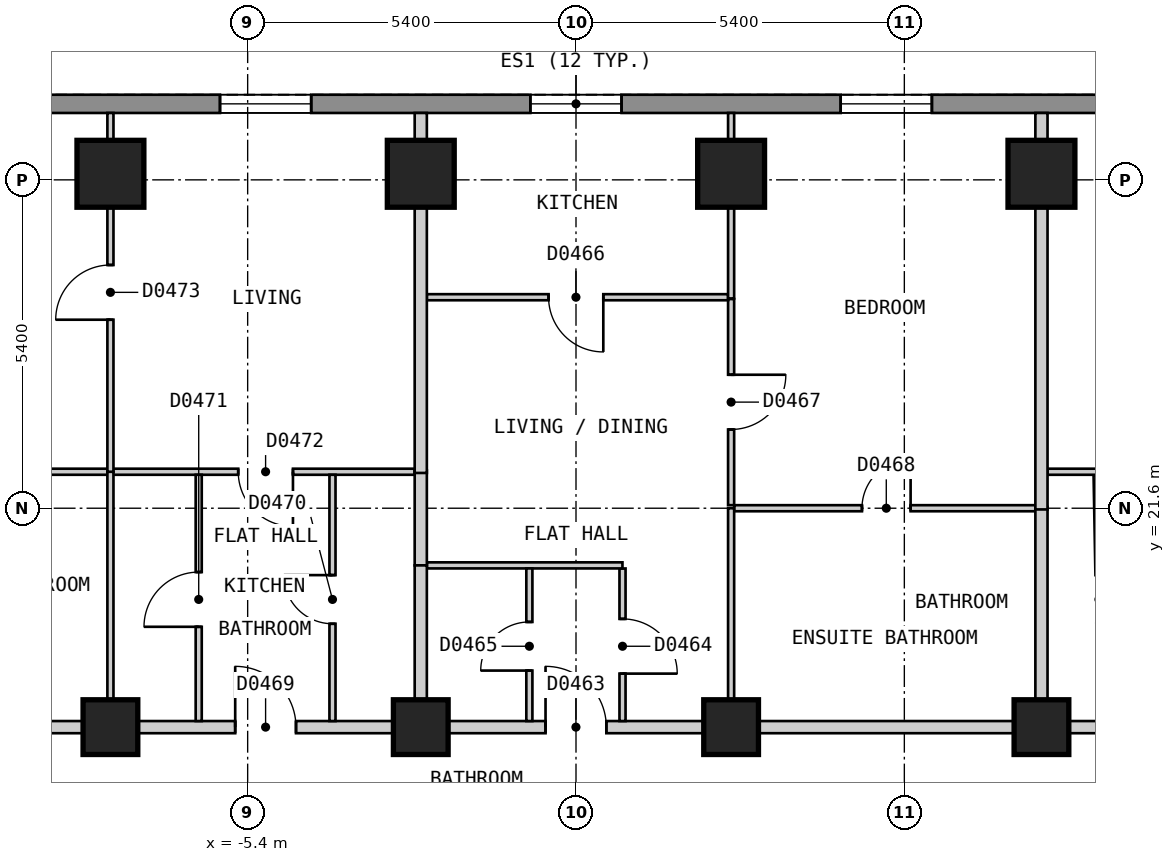
"""IFC4 building model, lengths in metres.
Left out: names, types, materials, properties, quantities, classifications, styles, units other than length and angle.
Written with IfcOpenShell. Run it as: python <this file> out.ifc"""

import sys

from ifc_helpers import new_model, si_unit, direction, frame, frame_2d, origin, origin_2d, place, context, subcontext, project, spatial, polyline, rectangle, outline, extrude, element, fill, save


model = new_model("IFC4")
c1 = context("Model", 3, precision=1e-05, world=origin(), true_north=direction((0.0, 1.0)))
c2 = subcontext(c1, "Body", "Model", "MODEL_VIEW")
j1 = project(units=[si_unit("LENGTHUNIT", "METRE"), si_unit("PLANEANGLEUNIT", "RADIAN")], contexts=[c1])
p1 = place(None, origin())
s1 = spatial("IfcSite", under=j1, at=p1, CompositionType="ELEMENT")
p2 = place(p1, origin())
s2 = spatial("IfcBuilding", under=s1, at=p2, CompositionType="ELEMENT")
p3 = place(p2, frame((0.0, 0.0, 26.4)))
s3 = spatial("IfcBuildingStorey", under=s2, at=p3, CompositionType="ELEMENT", Elevation=26.4)
for number, where, z_axis, x_axis in (
    (1, (7.655, 27.1, 0.0), (0.0, 0.0, 1.0), (-1.0, 0.0, 0.0)),
    (2, (2.551, 27.1, 0.0), (0.0, 0.0, 1.0), (-1.0, 0.0, 0.0)),
    (3, (-2.553, 27.1, 0.0), (0.0, 0.0, 1.0), (-1.0, 0.0, 0.0)),
    (4, (-7.657, 27.1, 0.0), (0.0, 0.0, 1.0), (-1.0, 0.0, 0.0)),
):
    element("IfcColumn", number, at=place(p3, frame(where, z_axis=z_axis, x_axis=x_axis)), inside=s3, PredefinedType="COLUMN", context=c2, shape_type="SweptSolid", body=[
        extrude(rectangle(XDim=1.1, YDim=1.1, at=origin_2d()), origin(), (0.0, 0.0, 1.0), 3.0),
    ])
for number, where, z_axis, x_axis in (
    (5, (7.655, 18.0, 0.0), (0.0, 0.0, 1.0), (-1.0, 0.0, 0.0)),
    (6, (2.551, 18.0, 0.0), (0.0, 0.0, 1.0), (-1.0, 0.0, 0.0)),
    (7, (-2.553, 18.0, 0.0), (0.0, 0.0, 1.0), (-1.0, 0.0, 0.0)),
    (8, (-7.657, 18.0, 0.0), (0.0, 0.0, 1.0), (-1.0, 0.0, 0.0)),
):
    element("IfcColumn", number, at=place(p3, frame(where, z_axis=z_axis, x_axis=x_axis)), inside=s3, PredefinedType="COLUMN", context=c2, shape_type="SweptSolid", body=[
        extrude(rectangle(XDim=0.9, YDim=0.9, at=origin_2d()), origin(), (0.0, 0.0, 1.0), 3.0),
    ])
p4 = place(p3, frame((13.51, 28.25, 0.0), z_axis=(0.0, 0.0, 1.0), x_axis=(-1.0, 0.0, 0.0)))
e9 = element("IfcWall", 9, at=p4, inside=s3, PredefinedType="SOLIDWALL", context=c2, shape_type="SweptSolid", body=[
    extrude(outline(polyline([(0.0, -0.15), (27.02, -0.15), (26.94, 0.15), (0.08, 0.15), (0.0, -0.15)])), origin(), (0.0, 0.0, 1.0), 2.7),
])
p5 = place(p4, frame((2.553, 0.0, 0.15)))
e10 = element("IfcOpeningElement", 10, at=p5, cuts=e9, PredefinedType="OPENING", context=c2, shape_type="SweptSolid", body=[
    extrude(rectangle(XDim=1.5, YDim=2.1, at=frame_2d((0.75, 1.05))), frame((0.0, 0.16, 0.0), z_axis=(0.0, -1.0, 0.0), x_axis=(1.0, 0.0, 0.0)), (0.0, 0.0, 1.0), 0.32),
])
p6 = place(p4, frame((7.657, 0.0, 0.15)))
e11 = element("IfcOpeningElement", 11, at=p6, cuts=e9, PredefinedType="OPENING", context=c2, shape_type="SweptSolid", body=[
    extrude(rectangle(XDim=1.5, YDim=2.1, at=frame_2d((0.75, 1.05))), frame((0.0, 0.16, 0.0), z_axis=(0.0, -1.0, 0.0), x_axis=(1.0, 0.0, 0.0)), (0.0, 0.0, 1.0), 0.32),
])
p7 = place(p4, frame((12.761, 0.0, 0.15)))
e12 = element("IfcOpeningElement", 12, at=p7, cuts=e9, PredefinedType="OPENING", context=c2, shape_type="SweptSolid", body=[
    extrude(rectangle(XDim=1.5, YDim=2.1, at=frame_2d((0.75, 1.05))), frame((0.0, 0.16, 0.0), z_axis=(0.0, -1.0, 0.0), x_axis=(1.0, 0.0, 0.0)), (0.0, 0.0, 1.0), 0.32),
])
p8 = place(p4, frame((17.865, 0.0, 0.15)))
e13 = element("IfcOpeningElement", 13, at=p8, cuts=e9, PredefinedType="OPENING", context=c2, shape_type="SweptSolid", body=[
    extrude(rectangle(XDim=1.5, YDim=2.1, at=frame_2d((0.75, 1.05))), frame((0.0, 0.16, 0.0), z_axis=(0.0, -1.0, 0.0), x_axis=(1.0, 0.0, 0.0)), (0.0, 0.0, 1.0), 0.32),
])
p9 = place(p4, frame((22.969, 0.0, 0.15)))
e14 = element("IfcOpeningElement", 14, at=p9, cuts=e9, PredefinedType="OPENING", context=c2, shape_type="SweptSolid", body=[
    extrude(rectangle(XDim=1.5, YDim=2.1, at=frame_2d((0.75, 1.05))), frame((0.0, 0.16, 0.0), z_axis=(0.0, -1.0, 0.0), x_axis=(1.0, 0.0, 0.0)), (0.0, 0.0, 1.0), 0.32),
])
p10 = place(p3, frame((-10.276, 18.0, 0.0), z_axis=(0.0, 0.0, 1.0), x_axis=(1.0, 0.0, 0.0)))
e15 = element("IfcWall", 15, at=p10, inside=s3, PredefinedType="PARTITIONING", context=c2, shape_type="SweptSolid", body=[
    extrude(rectangle(XDim=20.5, YDim=0.2, at=frame_2d((10.25, 0.0))), origin(), (0.0, 0.0, 1.0), 2.7),
])
p11 = place(p10, frame((19.265, 0.0, 0.0)))
e16 = element("IfcOpeningElement", 16, at=p11, cuts=e15, PredefinedType="OPENING", context=c2, shape_type="SweptSolid", body=[
    extrude(rectangle(XDim=1.0, YDim=2.1, at=frame_2d((0.5, 1.05))), frame((0.0, 0.11, 0.0), z_axis=(0.0, -1.0, 0.0), x_axis=(1.0, 0.0, 0.0)), (0.0, 0.0, 1.0), 0.22),
])
p12 = place(p10, frame((9.775, 0.0, 0.0)))
e17 = element("IfcOpeningElement", 17, at=p12, cuts=e15, PredefinedType="OPENING", context=c2, shape_type="SweptSolid", body=[
    extrude(rectangle(XDim=1.0, YDim=2.1, at=frame_2d((0.5, 1.05))), frame((0.0, 0.11, 0.0), z_axis=(0.0, -1.0, 0.0), x_axis=(1.0, 0.0, 0.0)), (0.0, 0.0, 1.0), 0.22),
])
p13 = place(p10, frame((4.671, 0.0, 0.0)))
e18 = element("IfcOpeningElement", 18, at=p13, cuts=e15, PredefinedType="OPENING", context=c2, shape_type="SweptSolid", body=[
    extrude(rectangle(XDim=1.0, YDim=2.1, at=frame_2d((0.5, 1.05))), frame((0.0, 0.11, 0.0), z_axis=(0.0, -1.0, 0.0), x_axis=(1.0, 0.0, 0.0)), (0.0, 0.0, 1.0), 0.22),
])
p14 = place(p3, frame((8.562, 22.15, 0.0), z_axis=(0.0, 0.0, 1.0), x_axis=(0.018504185939, -0.999828782894, 0.0)))
e19 = element("IfcWall", 19, at=p14, inside=s3, PredefinedType="PARTITIONING", context=c2, shape_type="SweptSolid", body=[
    extrude(rectangle(XDim=4.051, YDim=0.1, at=frame_2d((2.025, 0.0))), origin(), (0.0, 0.0, 1.0), 2.7),
])
p15 = place(p14, frame((1.65, 0.0, 0.0)))
e20 = element("IfcOpeningElement", 20, at=p15, cuts=e19, PredefinedType="OPENING", context=c2, shape_type="SweptSolid", body=[
    extrude(rectangle(XDim=0.8, YDim=2.1, at=frame_2d((0.4, 1.05))), frame((0.0, 0.06, 0.0), z_axis=(0.0, -1.0, 0.0), x_axis=(1.0, 0.0, 0.0)), (0.0, 0.0, 1.0), 0.12),
])
p16 = place(p3, frame((0.765, 20.609, 0.0), z_axis=(0.0, 0.0, 1.0), x_axis=(0.0, -1.0, 0.0)))
e21 = element("IfcWall", 21, at=p16, inside=s3, PredefinedType="PARTITIONING", context=c2, shape_type="SweptSolid", body=[
    extrude(rectangle(XDim=2.509, YDim=0.1, at=frame_2d((1.254, 0.0))), origin(), (0.0, 0.0, 1.0), 2.7),
])
p17 = place(p16, frame((0.829, 0.0, 0.0)))
e22 = element("IfcOpeningElement", 22, at=p17, cuts=e21, PredefinedType="OPENING", context=c2, shape_type="SweptSolid", body=[
    extrude(rectangle(XDim=0.9, YDim=2.1, at=frame_2d((0.45, 1.05))), frame((0.0, 0.06, 0.0), z_axis=(0.0, -1.0, 0.0), x_axis=(1.0, 0.0, 0.0)), (0.0, 0.0, 1.0), 0.12),
])
p18 = place(p3, frame((2.551, 25.04, 0.0), z_axis=(0.0, 0.0, 1.0), x_axis=(0.0, -1.0, 0.0)))
e23 = element("IfcWall", 23, at=p18, inside=s3, PredefinedType="PARTITIONING", context=c2, shape_type="SweptSolid", body=[
    extrude(rectangle(XDim=3.39, YDim=0.1, at=frame_2d((1.695, 0.0))), origin(), (0.0, 0.0, 1.0), 2.7),
])
p19 = place(p18, frame((1.245, 0.0, 0.0)))
e24 = element("IfcOpeningElement", 24, at=p19, cuts=e23, PredefinedType="OPENING", context=c2, shape_type="SweptSolid", body=[
    extrude(rectangle(XDim=0.9, YDim=2.1, at=frame_2d((0.45, 1.05))), frame((0.0, 0.06, 0.0), z_axis=(0.0, -1.0, 0.0), x_axis=(1.0, 0.0, 0.0)), (0.0, 0.0, 1.0), 0.12),
])
p20 = place(p3, frame((-2.453, 20.66, 0.0), z_axis=(0.0, 0.0, 1.0), x_axis=(1.0, 0.0, 0.0)))
e25 = element("IfcWall", 25, at=p20, inside=s3, PredefinedType="PARTITIONING", context=c2, shape_type="SweptSolid", body=[
    extrude(rectangle(XDim=3.217, YDim=0.1, at=frame_2d((1.608, 0.0))), origin(), (0.0, 0.0, 1.0), 2.7),
])
p21 = place(p3, frame((2.601, 21.6, 0.0), z_axis=(0.0, 0.0, 1.0), x_axis=(1.0, 0.0, 0.0)))
e26 = element("IfcWall", 26, at=p21, inside=s3, PredefinedType="PARTITIONING", context=c2, shape_type="SweptSolid", body=[
    extrude(rectangle(XDim=4.954, YDim=0.1, at=frame_2d((2.477, 0.0))), origin(), (0.0, 0.0, 1.0), 2.7),
])
p22 = place(p21, frame((2.102, 0.0, 0.0)))
e27 = element("IfcOpeningElement", 27, at=p22, cuts=e26, PredefinedType="OPENING", context=c2, shape_type="SweptSolid", body=[
    extrude(rectangle(XDim=0.8, YDim=2.1, at=frame_2d((0.4, 1.05))), frame((0.0, 0.06, 0.0), z_axis=(0.0, -1.0, 0.0), x_axis=(1.0, 0.0, 0.0)), (0.0, 0.0, 1.0), 0.12),
])
p23 = place(p3, frame((-12.711, 22.2, 0.0), z_axis=(0.0, 0.0, 1.0), x_axis=(1.0, 0.0, 0.0)))
e28 = element("IfcWall", 28, at=p23, inside=s3, PredefinedType="PARTITIONING", context=c2, shape_type="SweptSolid", body=[
    extrude(rectangle(XDim=10.058, YDim=0.1, at=frame_2d((5.029, 0.0))), origin(), (0.0, 0.0, 1.0), 2.7),
])
p24 = place(p23, frame((7.156, 0.0, 0.0)))
e29 = element("IfcOpeningElement", 29, at=p24, cuts=e28, PredefinedType="OPENING", context=c2, shape_type="SweptSolid", body=[
    extrude(rectangle(XDim=0.9, YDim=2.1, at=frame_2d((0.45, 1.05))), frame((0.0, 0.06, 0.0), z_axis=(0.0, -1.0, 0.0), x_axis=(1.0, 0.0, 0.0)), (0.0, 0.0, 1.0), 0.12),
])
p25 = place(p23, frame((2.102, 0.0, 0.0)))
e30 = element("IfcOpeningElement", 30, at=p25, cuts=e28, PredefinedType="OPENING", context=c2, shape_type="SweptSolid", body=[
    extrude(rectangle(XDim=0.8, YDim=2.1, at=frame_2d((0.4, 1.05))), frame((0.0, 0.06, 0.0), z_axis=(0.0, -1.0, 0.0), x_axis=(1.0, 0.0, 0.0)), (0.0, 0.0, 1.0), 0.12),
])
p26 = place(p3, frame((7.755, 22.2, 0.0), z_axis=(0.0, 0.0, 1.0), x_axis=(1.0, 0.0, 0.0)))
e31 = element("IfcWall", 31, at=p26, inside=s3, PredefinedType="PARTITIONING", context=c2, shape_type="SweptSolid", body=[
    extrude(rectangle(XDim=4.947, YDim=0.1, at=frame_2d((2.474, 0.0))), origin(), (0.0, 0.0, 1.0), 2.7),
])
p27 = place(p26, frame((1.206, 0.0, 0.0)))
e32 = element("IfcOpeningElement", 32, at=p27, cuts=e31, PredefinedType="OPENING", context=c2, shape_type="SweptSolid", body=[
    extrude(rectangle(XDim=0.9, YDim=2.1, at=frame_2d((0.45, 1.05))), frame((0.0, 0.06, 0.0), z_axis=(0.0, -1.0, 0.0), x_axis=(1.0, 0.0, 0.0)), (0.0, 0.0, 1.0), 0.12),
])
p28 = place(p3, frame((-2.453, 25.07, 0.0), z_axis=(0.0, 0.0, 1.0), x_axis=(1.0, 0.0, 0.0)))
e33 = element("IfcWall", 33, at=p28, inside=s3, PredefinedType="PARTITIONING", context=c2, shape_type="SweptSolid", body=[
    extrude(rectangle(XDim=4.954, YDim=0.1, at=frame_2d((2.477, 0.0))), origin(), (0.0, 0.0, 1.0), 2.7),
])
p29 = place(p28, frame((2.002, 0.0, 0.0)))
e34 = element("IfcOpeningElement", 34, at=p29, cuts=e33, PredefinedType="OPENING", context=c2, shape_type="SweptSolid", body=[
    extrude(rectangle(XDim=0.9, YDim=2.1, at=frame_2d((0.45, 1.05))), frame((0.0, 0.06, 0.0), z_axis=(0.0, -1.0, 0.0), x_axis=(1.0, 0.0, 0.0)), (0.0, 0.0, 1.0), 0.12),
])
p30 = place(p3, frame((2.551, 18.1, 0.0), z_axis=(0.0, 0.0, 1.0), x_axis=(0.0, 1.0, 0.0)))
e35 = element("IfcWall", 35, at=p30, inside=s3, PredefinedType="PARTITIONING", context=c2, shape_type="SweptSolid", body=[
    extrude(rectangle(XDim=3.5, YDim=0.1, at=frame_2d((1.75, 0.0))), origin(), (0.0, 0.0, 1.0), 2.7),
])
p31 = place(p3, frame((2.551, 25.05, 0.0), z_axis=(0.0, 0.0, 1.0), x_axis=(0.0, 1.0, 0.0)))
e36 = element("IfcWall", 36, at=p31, inside=s3, PredefinedType="PARTITIONING", context=c2, shape_type="SweptSolid", body=[
    extrude(rectangle(XDim=3.05, YDim=0.1, at=frame_2d((1.525, 0.0))), origin(), (0.0, 0.0, 1.0), 2.7),
])
p32 = place(p3, frame((-4.005, 18.1, 0.0), z_axis=(0.0, 0.0, 1.0), x_axis=(0.0, 1.0, 0.0)))
e37 = element("IfcWall", 37, at=p32, inside=s3, PredefinedType="PARTITIONING", context=c2, shape_type="SweptSolid", body=[
    extrude(rectangle(XDim=4.05, YDim=0.1, at=frame_2d((2.025, 0.0))), origin(), (0.0, 0.0, 1.0), 2.7),
])
p33 = place(p32, frame((1.6, 0.0, 0.0)))
e38 = element("IfcOpeningElement", 38, at=p33, cuts=e37, PredefinedType="OPENING", context=c2, shape_type="SweptSolid", body=[
    extrude(rectangle(XDim=0.8, YDim=2.1, at=frame_2d((0.4, 1.05))), frame((0.0, 0.06, 0.0), z_axis=(0.0, -1.0, 0.0), x_axis=(1.0, 0.0, 0.0)), (0.0, 0.0, 1.0), 0.12),
])
p34 = place(p3, frame((-6.205, 18.1, 0.0), z_axis=(0.0, 0.0, 1.0), x_axis=(0.0, 1.0, 0.0)))
e39 = element("IfcWall", 39, at=p34, inside=s3, PredefinedType="PARTITIONING", context=c2, shape_type="SweptSolid", body=[
    extrude(rectangle(XDim=4.05, YDim=0.1, at=frame_2d((2.025, 0.0))), origin(), (0.0, 0.0, 1.0), 2.7),
])
p35 = place(p34, frame((1.55, 0.0, 0.0)))
e40 = element("IfcOpeningElement", 40, at=p35, cuts=e39, PredefinedType="OPENING", context=c2, shape_type="SweptSolid", body=[
    extrude(rectangle(XDim=0.9, YDim=2.1, at=frame_2d((0.45, 1.05))), frame((0.0, 0.06, 0.0), z_axis=(0.0, -1.0, 0.0), x_axis=(1.0, 0.0, 0.0)), (0.0, 0.0, 1.0), 0.12),
])
p36 = place(p3, frame((-7.657, 18.1, 0.0), z_axis=(0.0, 0.0, 1.0), x_axis=(0.0, 1.0, 0.0)))
e41 = element("IfcWall", 41, at=p36, inside=s3, PredefinedType="PARTITIONING", context=c2, shape_type="SweptSolid", body=[
    extrude(rectangle(XDim=4.1, YDim=0.1, at=frame_2d((2.05, 0.0))), origin(), (0.0, 0.0, 1.0), 2.7),
])
p37 = place(p3, frame((-0.767, 18.1, 0.0), z_axis=(0.0, 0.0, 1.0), x_axis=(0.0, 1.0, 0.0)))
e42 = element("IfcWall", 42, at=p37, inside=s3, PredefinedType="PARTITIONING", context=c2, shape_type="SweptSolid", body=[
    extrude(rectangle(XDim=2.51, YDim=0.1, at=frame_2d((1.255, 0.0))), origin(), (0.0, 0.0, 1.0), 2.7),
])
p38 = place(p37, frame((0.83, 0.0, 0.0)))
e43 = element("IfcOpeningElement", 43, at=p38, cuts=e42, PredefinedType="OPENING", context=c2, shape_type="SweptSolid", body=[
    extrude(rectangle(XDim=0.8, YDim=2.1, at=frame_2d((0.4, 1.05))), frame((0.0, 0.06, 0.0), z_axis=(0.0, -1.0, 0.0), x_axis=(1.0, 0.0, 0.0)), (0.0, 0.0, 1.0), 0.12),
])
p39 = place(p3, frame((-2.553, 22.22, 0.0), z_axis=(0.0, 0.0, 1.0), x_axis=(0.0, -1.0, 0.0)))
e44 = element("IfcWall", 44, at=p39, inside=s3, PredefinedType="PARTITIONING", context=c2, shape_type="SweptSolid", body=[
    extrude(rectangle(XDim=1.56, YDim=0.2, at=frame_2d((0.78, 0.0))), origin(), (0.0, 0.0, 1.0), 2.7),
])
p40 = place(p3, frame((7.655, 21.62, 0.0), z_axis=(0.0, 0.0, 1.0), x_axis=(0.0, -1.0, 0.0)))
e45 = element("IfcWall", 45, at=p40, inside=s3, PredefinedType="PARTITIONING", context=c2, shape_type="SweptSolid", body=[
    extrude(rectangle(XDim=3.52, YDim=0.2, at=frame_2d((1.76, 0.0))), origin(), (0.0, 0.0, 1.0), 2.7),
])
p41 = place(p3, frame((7.655, 21.58, 0.0), z_axis=(0.0, 0.0, 1.0), x_axis=(0.0, 1.0, 0.0)))
e46 = element("IfcWall", 46, at=p41, inside=s3, PredefinedType="PARTITIONING", context=c2, shape_type="SweptSolid", body=[
    extrude(rectangle(XDim=6.52, YDim=0.2, at=frame_2d((3.26, 0.0))), origin(), (0.0, 0.0, 1.0), 2.7),
])
p42 = place(p3, frame((-2.553, 18.1, 0.0), z_axis=(0.0, 0.0, 1.0), x_axis=(0.0, 1.0, 0.0)))
e47 = element("IfcWall", 47, at=p42, inside=s3, PredefinedType="PARTITIONING", context=c2, shape_type="SweptSolid", body=[
    extrude(rectangle(XDim=2.56, YDim=0.2, at=frame_2d((1.28, 0.0))), origin(), (0.0, 0.0, 1.0), 2.7),
])
p43 = place(p3, frame((-2.553, 22.18, 0.0), z_axis=(0.0, 0.0, 1.0), x_axis=(0.0, 1.0, 0.0)))
e48 = element("IfcWall", 48, at=p43, inside=s3, PredefinedType="PARTITIONING", context=c2, shape_type="SweptSolid", body=[
    extrude(rectangle(XDim=5.92, YDim=0.2, at=frame_2d((2.96, 0.0))), origin(), (0.0, 0.0, 1.0), 2.7),
])
p44 = place(p3, frame((-7.657, 22.2, 0.0), z_axis=(0.0, 0.0, 1.0), x_axis=(0.0, 1.0, 0.0)))
e49 = element("IfcWall", 49, at=p44, inside=s3, PredefinedType="PARTITIONING", context=c2, shape_type="SweptSolid", body=[
    extrude(rectangle(XDim=5.9, YDim=0.1, at=frame_2d((2.95, 0.0))), origin(), (0.0, 0.0, 1.0), 2.7),
])
p45 = place(p44, frame((2.5, 0.0, 0.0)))
e50 = element("IfcOpeningElement", 50, at=p45, cuts=e49, PredefinedType="OPENING", context=c2, shape_type="SweptSolid", body=[
    extrude(rectangle(XDim=0.9, YDim=2.1, at=frame_2d((0.45, 1.05))), frame((0.0, 0.06, 0.0), z_axis=(0.0, -1.0, 0.0), x_axis=(1.0, 0.0, 0.0)), (0.0, 0.0, 1.0), 0.12),
])
p46 = place(p6, origin())
e51 = element("IfcWindow", 51, at=p46, inside=s3, PartitioningType="SINGLE_PANEL", PredefinedType="WINDOW", context=c2, shape_type="SweptSolid", body=[
    extrude(rectangle(XDim=1.5, YDim=2.1, at=frame_2d((0.75, 1.05))), frame((0.0, 0.03, 0.0), z_axis=(0.0, -1.0, 0.0), x_axis=(1.0, 0.0, 0.0)), (0.0, 0.0, 1.0), 0.06),
])
fill(e11, e51)
p47 = place(p7, origin())
e52 = element("IfcWindow", 52, at=p47, inside=s3, PartitioningType="SINGLE_PANEL", PredefinedType="WINDOW", context=c2, shape_type="SweptSolid", body=[
    extrude(rectangle(XDim=1.5, YDim=2.1, at=frame_2d((0.75, 1.05))), frame((0.0, 0.03, 0.0), z_axis=(0.0, -1.0, 0.0), x_axis=(1.0, 0.0, 0.0)), (0.0, 0.0, 1.0), 0.06),
])
fill(e12, e52)
p48 = place(p8, origin())
e53 = element("IfcWindow", 53, at=p48, inside=s3, PartitioningType="SINGLE_PANEL", PredefinedType="WINDOW", context=c2, shape_type="SweptSolid", body=[
    extrude(rectangle(XDim=1.5, YDim=2.1, at=frame_2d((0.75, 1.05))), frame((0.0, 0.03, 0.0), z_axis=(0.0, -1.0, 0.0), x_axis=(1.0, 0.0, 0.0)), (0.0, 0.0, 1.0), 0.06),
])
fill(e13, e53)
p49 = place(p12, origin())
e54 = element("IfcDoor", 54, at=p49, inside=s3, OperationType="SINGLE_SWING_LEFT", PredefinedType="DOOR", context=c2, shape_type="SweptSolid", body=[
    extrude(rectangle(XDim=1.0, YDim=2.1, at=frame_2d((0.5, 1.05))), frame((0.0, 0.025, 0.0), z_axis=(0.0, -1.0, 0.0), x_axis=(1.0, 0.0, 0.0)), (0.0, 0.0, 1.0), 0.05),
])
fill(e17, e54)
p50 = place(p17, origin())
e55 = element("IfcDoor", 55, at=p50, inside=s3, OperationType="SINGLE_SWING_RIGHT", PredefinedType="DOOR", context=c2, shape_type="SweptSolid", body=[
    extrude(rectangle(XDim=0.9, YDim=2.1, at=frame_2d((0.45, 1.05))), frame((0.0, 0.025, 0.0), z_axis=(0.0, -1.0, 0.0), x_axis=(1.0, 0.0, 0.0)), (0.0, 0.0, 1.0), 0.05),
])
fill(e22, e55)
p51 = place(p38, origin())
e56 = element("IfcDoor", 56, at=p51, inside=s3, OperationType="SINGLE_SWING_LEFT", PredefinedType="DOOR", context=c2, shape_type="SweptSolid", body=[
    extrude(rectangle(XDim=0.8, YDim=2.1, at=frame_2d((0.4, 1.05))), frame((0.0, 0.025, 0.0), z_axis=(0.0, -1.0, 0.0), x_axis=(1.0, 0.0, 0.0)), (0.0, 0.0, 1.0), 0.05),
])
fill(e43, e56)
p52 = place(p29, origin())
e57 = element("IfcDoor", 57, at=p52, inside=s3, OperationType="SINGLE_SWING_RIGHT", PredefinedType="DOOR", context=c2, shape_type="SweptSolid", body=[
    extrude(rectangle(XDim=0.9, YDim=2.1, at=frame_2d((0.45, 1.05))), frame((0.0, 0.025, 0.0), z_axis=(0.0, -1.0, 0.0), x_axis=(1.0, 0.0, 0.0)), (0.0, 0.0, 1.0), 0.05),
])
fill(e34, e57)
p53 = place(p19, origin())
e58 = element("IfcDoor", 58, at=p53, inside=s3, OperationType="SINGLE_SWING_LEFT", PredefinedType="DOOR", context=c2, shape_type="SweptSolid", body=[
    extrude(rectangle(XDim=0.9, YDim=2.1, at=frame_2d((0.45, 1.05))), frame((0.0, 0.025, 0.0), z_axis=(0.0, -1.0, 0.0), x_axis=(1.0, 0.0, 0.0)), (0.0, 0.0, 1.0), 0.05),
])
fill(e24, e58)
p54 = place(p22, origin())
e59 = element("IfcDoor", 59, at=p54, inside=s3, OperationType="SINGLE_SWING_RIGHT", PredefinedType="DOOR", context=c2, shape_type="SweptSolid", body=[
    extrude(rectangle(XDim=0.8, YDim=2.1, at=frame_2d((0.4, 1.05))), frame((0.0, 0.025, 0.0), z_axis=(0.0, -1.0, 0.0), x_axis=(1.0, 0.0, 0.0)), (0.0, 0.0, 1.0), 0.05),
])
fill(e27, e59)
p55 = place(p13, origin())
e60 = element("IfcDoor", 60, at=p55, inside=s3, OperationType="SINGLE_SWING_LEFT", PredefinedType="DOOR", context=c2, shape_type="SweptSolid", body=[
    extrude(rectangle(XDim=1.0, YDim=2.1, at=frame_2d((0.5, 1.05))), frame((0.0, 0.025, 0.0), z_axis=(0.0, -1.0, 0.0), x_axis=(1.0, 0.0, 0.0)), (0.0, 0.0, 1.0), 0.05),
])
fill(e18, e60)
p56 = place(p33, origin())
e61 = element("IfcDoor", 61, at=p56, inside=s3, OperationType="SINGLE_SWING_RIGHT", PredefinedType="DOOR", context=c2, shape_type="SweptSolid", body=[
    extrude(rectangle(XDim=0.8, YDim=2.1, at=frame_2d((0.4, 1.05))), frame((0.0, 0.025, 0.0), z_axis=(0.0, -1.0, 0.0), x_axis=(1.0, 0.0, 0.0)), (0.0, 0.0, 1.0), 0.05),
])
fill(e38, e61)
p57 = place(p35, origin())
e62 = element("IfcDoor", 62, at=p57, inside=s3, OperationType="SINGLE_SWING_LEFT", PredefinedType="DOOR", context=c2, shape_type="SweptSolid", body=[
    extrude(rectangle(XDim=0.9, YDim=2.1, at=frame_2d((0.45, 1.05))), frame((0.0, 0.025, 0.0), z_axis=(0.0, -1.0, 0.0), x_axis=(1.0, 0.0, 0.0)), (0.0, 0.0, 1.0), 0.05),
])
fill(e40, e62)
p58 = place(p24, origin())
e63 = element("IfcDoor", 63, at=p58, inside=s3, OperationType="SINGLE_SWING_RIGHT", PredefinedType="DOOR", context=c2, shape_type="SweptSolid", body=[
    extrude(rectangle(XDim=0.9, YDim=2.1, at=frame_2d((0.45, 1.05))), frame((0.0, 0.025, 0.0), z_axis=(0.0, -1.0, 0.0), x_axis=(1.0, 0.0, 0.0)), (0.0, 0.0, 1.0), 0.05),
])
fill(e29, e63)
p59 = place(p45, origin())
e64 = element("IfcDoor", 64, at=p59, inside=s3, OperationType="SINGLE_SWING_LEFT", PredefinedType="DOOR", context=c2, shape_type="SweptSolid", body=[
    extrude(rectangle(XDim=0.9, YDim=2.1, at=frame_2d((0.45, 1.05))), frame((0.0, 0.025, 0.0), z_axis=(0.0, -1.0, 0.0), x_axis=(1.0, 0.0, 0.0)), (0.0, 0.0, 1.0), 0.05),
])
fill(e50, e64)
save(model, sys.argv[1])
